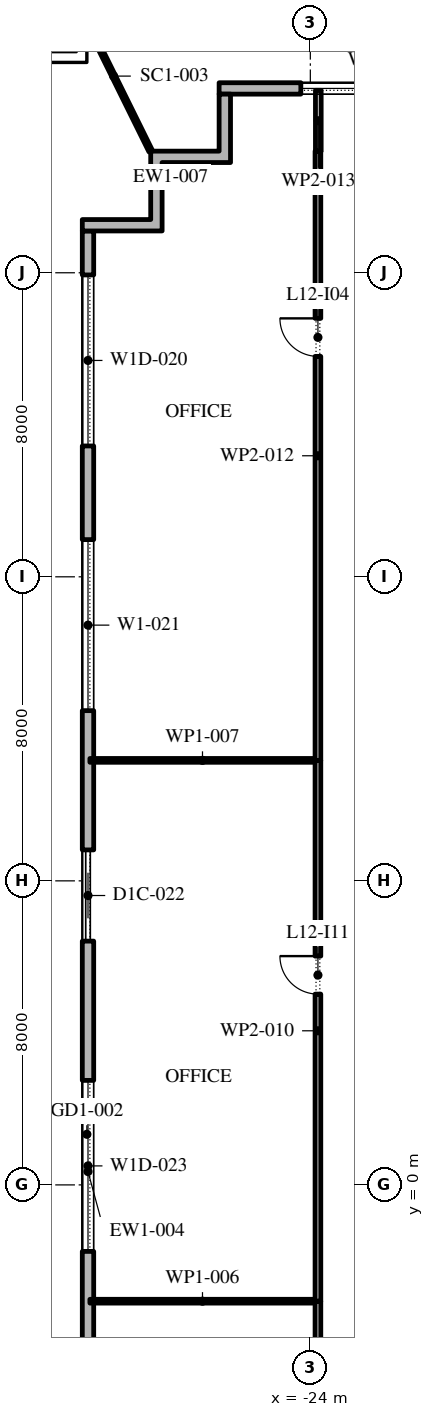
"""IFC4 building model, lengths in metres.
Left out: names, types, materials, properties, quantities, classifications, styles, units other than length and angle.
Written with IfcOpenShell. Run it as: python <this file> out.ifc"""

import sys

from ifc_helpers import new_model, si_unit, direction, frame, frame_2d, origin, place, context, subcontext, project, spatial, polyline, rectangle, outline, extrude, element, fill, save


model = new_model("IFC4")
c1 = context("Model", 3, precision=1e-05, world=origin(), true_north=direction((0.0, 1.0)))
c2 = subcontext(c1, "Body", "Model", "MODEL_VIEW")
j1 = project(units=[si_unit("LENGTHUNIT", "METRE"), si_unit("PLANEANGLEUNIT", "RADIAN")], contexts=[c1])
p1 = place(None, origin())
s1 = spatial("IfcSite", under=j1, at=p1, CompositionType="ELEMENT")
p2 = place(p1, origin())
s2 = spatial("IfcBuilding", under=s1, at=p2, CompositionType="ELEMENT")
p3 = place(p2, frame((0.0, 0.0, 60.6)))
s3 = spatial("IfcBuildingStorey", under=s2, at=p3, CompositionType="ELEMENT", Elevation=60.6)
p4 = place(p3, frame((26.1, 28.85, 0.0), z_axis=(0.0, 0.0, 1.0), x_axis=(-1.0, 0.0, 0.0)))
e1 = element("IfcWall", 1, at=p4, inside=s3, PredefinedType="STANDARD", context=c2, shape_type="SweptSolid", body=[
    extrude(rectangle(XDim=52.5, YDim=0.3, at=frame_2d((26.25, 0.0))), origin(), (0.0, 0.0, 1.0), 4.0),
])
p5 = place(p4, frame((2.0, 0.0, 0.45)))
e2 = element("IfcOpeningElement", 2, at=p5, cuts=e1, PredefinedType="OPENING", context=c2, shape_type="SweptSolid", body=[
    extrude(rectangle(XDim=4.5, YDim=3.0, at=frame_2d((2.25, 1.5))), frame((0.0, 0.16, 0.0), z_axis=(0.0, -1.0, 0.0), x_axis=(1.0, 0.0, 0.0)), (0.0, 0.0, 1.0), 0.32),
])
p6 = place(p4, frame((10.65, 0.0, 0.45)))
e3 = element("IfcOpeningElement", 3, at=p6, cuts=e1, PredefinedType="OPENING", context=c2, shape_type="SweptSolid", body=[
    extrude(rectangle(XDim=4.5, YDim=3.0, at=frame_2d((2.25, 1.5))), frame((0.0, 0.16, 0.0), z_axis=(0.0, -1.0, 0.0), x_axis=(1.0, 0.0, 0.0)), (0.0, 0.0, 1.0), 0.32),
])
p7 = place(p4, frame((20.5, 0.0, 0.0)))
e4 = element("IfcOpeningElement", 4, at=p7, cuts=e1, PredefinedType="OPENING", context=c2, shape_type="SweptSolid", body=[
    extrude(rectangle(XDim=2.4, YDim=3.5, at=frame_2d((1.2, 1.75))), frame((0.0, 0.16, 0.0), z_axis=(0.0, -1.0, 0.0), x_axis=(1.0, 0.0, 0.0)), (0.0, 0.0, 1.0), 0.32),
])
p8 = place(p4, frame((28.25, 0.0, 0.45)))
e5 = element("IfcOpeningElement", 5, at=p8, cuts=e1, PredefinedType="OPENING", context=c2, shape_type="SweptSolid", body=[
    extrude(rectangle(XDim=4.5, YDim=3.0, at=frame_2d((2.25, 1.5))), frame((0.0, 0.16, 0.0), z_axis=(0.0, -1.0, 0.0), x_axis=(1.0, 0.0, 0.0)), (0.0, 0.0, 1.0), 0.32),
])
p9 = place(p4, frame((37.05, 0.0, 0.45)))
e6 = element("IfcOpeningElement", 6, at=p9, cuts=e1, PredefinedType="OPENING", context=c2, shape_type="SweptSolid", body=[
    extrude(rectangle(XDim=4.5, YDim=3.0, at=frame_2d((2.25, 1.5))), frame((0.0, 0.16, 0.0), z_axis=(0.0, -1.0, 0.0), x_axis=(1.0, 0.0, 0.0)), (0.0, 0.0, 1.0), 0.32),
])
p10 = place(p4, frame((45.85, 0.0, 0.45)))
e7 = element("IfcOpeningElement", 7, at=p10, cuts=e1, PredefinedType="OPENING", context=c2, shape_type="SweptSolid", body=[
    extrude(rectangle(XDim=4.5, YDim=3.0, at=frame_2d((2.25, 1.5))), frame((0.0, 0.16, 0.0), z_axis=(0.0, -1.0, 0.0), x_axis=(1.0, 0.0, 0.0)), (0.0, 0.0, 1.0), 0.32),
])
p11 = place(p3, frame((-29.85, 25.1, 0.0), z_axis=(0.0, 0.0, 1.0), x_axis=(0.0, -1.0, 0.0)))
e8 = element("IfcWall", 8, at=p11, inside=s3, PredefinedType="STANDARD", context=c2, shape_type="SweptSolid", body=[
    extrude(rectangle(XDim=49.5, YDim=0.3, at=frame_2d((24.75, 0.0))), origin(), (0.0, 0.0, 1.0), 4.0),
])
p12 = place(p11, frame((1.157, 0.0, 0.45)))
e9 = element("IfcOpeningElement", 9, at=p12, cuts=e8, PredefinedType="OPENING", context=c2, shape_type="SweptSolid", body=[
    extrude(rectangle(XDim=4.5, YDim=2.875, at=frame_2d((2.25, 1.438))), frame((0.0, 0.16, 0.0), z_axis=(0.0, -1.0, 0.0), x_axis=(1.0, 0.0, 0.0)), (0.0, 0.0, 1.0), 0.32),
])
p13 = place(p11, frame((8.121, 0.0, 0.45)))
e10 = element("IfcOpeningElement", 10, at=p13, cuts=e8, PredefinedType="OPENING", context=c2, shape_type="SweptSolid", body=[
    extrude(rectangle(XDim=4.5, YDim=3.05, at=frame_2d((2.25, 1.525))), frame((0.0, 0.16, 0.0), z_axis=(0.0, -1.0, 0.0), x_axis=(1.0, 0.0, 0.0)), (0.0, 0.0, 1.0), 0.32),
])
p14 = place(p11, frame((16.286, 0.0, 0.0)))
e11 = element("IfcOpeningElement", 11, at=p14, cuts=e8, PredefinedType="OPENING", context=c2, shape_type="SweptSolid", body=[
    extrude(rectangle(XDim=2.4, YDim=3.325, at=frame_2d((1.2, 1.663))), frame((0.0, 0.16, 0.0), z_axis=(0.0, -1.0, 0.0), x_axis=(1.0, 0.0, 0.0)), (0.0, 0.0, 1.0), 0.32),
])
p15 = place(p11, frame((22.35, 0.0, 0.45)))
e12 = element("IfcOpeningElement", 12, at=p15, cuts=e8, PredefinedType="OPENING", context=c2, shape_type="SweptSolid", body=[
    extrude(rectangle(XDim=4.5, YDim=2.875, at=frame_2d((2.25, 1.438))), frame((0.0, 0.16, 0.0), z_axis=(0.0, -1.0, 0.0), x_axis=(1.0, 0.0, 0.0)), (0.0, 0.0, 1.0), 0.32),
])
p16 = place(p11, frame((29.464, 0.0, 0.45)))
e13 = element("IfcOpeningElement", 13, at=p16, cuts=e8, PredefinedType="OPENING", context=c2, shape_type="SweptSolid", body=[
    extrude(rectangle(XDim=4.5, YDim=2.875, at=frame_2d((2.25, 1.438))), frame((0.0, 0.16, 0.0), z_axis=(0.0, -1.0, 0.0), x_axis=(1.0, 0.0, 0.0)), (0.0, 0.0, 1.0), 0.32),
])
p17 = place(p11, frame((36.579, 0.0, 0.45)))
e14 = element("IfcOpeningElement", 14, at=p17, cuts=e8, PredefinedType="OPENING", context=c2, shape_type="SweptSolid", body=[
    extrude(rectangle(XDim=4.5, YDim=2.825, at=frame_2d((2.25, 1.413))), frame((0.0, 0.16, 0.0), z_axis=(0.0, -1.0, 0.0), x_axis=(1.0, 0.0, 0.0)), (0.0, 0.0, 1.0), 0.32),
])
p18 = place(p11, frame((44.743, 0.0, 0.0)))
e15 = element("IfcOpeningElement", 15, at=p18, cuts=e8, PredefinedType="OPENING", context=c2, shape_type="SweptSolid", body=[
    extrude(rectangle(XDim=2.4, YDim=3.5, at=frame_2d((1.2, 1.75))), frame((0.0, 0.16, 0.0), z_axis=(0.0, -1.0, 0.0), x_axis=(1.0, 0.0, 0.0)), (0.0, 0.0, 1.0), 0.32),
])
p19 = place(p3, origin())
e16 = element("IfcWall", 16, at=p19, inside=s3, PredefinedType="STANDARD", context=c2, shape_type="SweptSolid", body=[
    extrude(outline(polyline([(-28.2, 25.4), (-28.2, 27.2), (-26.4, 27.2), (-26.4, 28.7), (-26.1, 28.7), (-26.1, 26.9), (-27.9, 26.9), (-27.9, 25.1), (-30.0, 25.1), (-30.0, 25.4), (-28.2, 25.4)])), origin(), (0.0, 0.0, 1.0), 4.0),
])
p20 = place(p3, frame((-28.2, 27.2, -0.05), z_axis=(0.0, 0.0, 1.0), x_axis=(-0.443174643924, 0.896435293249, 0.0)))
e17 = element("IfcWall", 17, at=p20, inside=s3, PredefinedType="STANDARD", context=c2, shape_type="SweptSolid", body=[
    extrude(rectangle(XDim=4.406, YDim=0.1, at=frame_2d((2.203, 0.0))), origin(), (0.0, 0.0, 1.0), 4.05),
])
p21 = place(p3, frame((-23.8, -10.12, 0.0), z_axis=(0.0, 0.0, 1.0), x_axis=(0.0, 1.0, 0.0)))
e18 = element("IfcWall", 18, at=p21, inside=s3, PredefinedType="PARTITIONING", context=c2, shape_type="SweptSolid", body=[
    extrude(rectangle(XDim=7.06, YDim=0.15, at=frame_2d((3.53, 0.0))), origin(), (0.0, 0.0, 1.0), 4.0),
])
p22 = place(p21, frame((1.66, 0.0, 0.0)))
e19 = element("IfcOpeningElement", 19, at=p22, cuts=e18, PredefinedType="OPENING", context=c2, shape_type="SweptSolid", body=[
    extrude(rectangle(XDim=1.0, YDim=2.1, at=frame_2d((0.5, 1.05))), frame((0.0, 0.085, 0.0), z_axis=(0.0, -1.0, 0.0), x_axis=(1.0, 0.0, 0.0)), (0.0, 0.0, 1.0), 0.17),
])
p23 = place(p3, frame((-23.875, -3.06, 0.0), z_axis=(0.0, 0.0, 1.0), x_axis=(-1.0, 0.0, 0.0)))
e20 = element("IfcWall", 20, at=p23, inside=s3, PredefinedType="PARTITIONING", context=c2, shape_type="SweptSolid", body=[
    extrude(rectangle(XDim=5.925, YDim=0.1, at=frame_2d((2.962, 0.0))), origin(), (0.0, 0.0, 1.0), 4.0),
])
p24 = place(p3, frame((-23.8, -3.06, 0.0), z_axis=(0.0, 0.0, 1.0), x_axis=(0.0, 1.0, 0.0)))
e21 = element("IfcWall", 21, at=p24, inside=s3, PredefinedType="PARTITIONING", context=c2, shape_type="SweptSolid", body=[
    extrude(rectangle(XDim=14.23, YDim=0.15, at=frame_2d((7.115, 0.0))), origin(), (0.0, 0.0, 1.0), 4.0),
])
p25 = place(p24, frame((8.08, 0.0, 0.0)))
e22 = element("IfcOpeningElement", 22, at=p25, cuts=e21, PredefinedType="OPENING", context=c2, shape_type="SweptSolid", body=[
    extrude(rectangle(XDim=1.0, YDim=2.1, at=frame_2d((0.5, 1.05))), frame((0.0, 0.085, 0.0), z_axis=(0.0, -1.0, 0.0), x_axis=(1.0, 0.0, 0.0)), (0.0, 0.0, 1.0), 0.17),
])
p26 = place(p3, frame((-23.875, 11.17, 0.0), z_axis=(0.0, 0.0, 1.0), x_axis=(-1.0, 0.0, 0.0)))
e23 = element("IfcWall", 23, at=p26, inside=s3, PredefinedType="PARTITIONING", context=c2, shape_type="SweptSolid", body=[
    extrude(rectangle(XDim=5.925, YDim=0.1, at=frame_2d((2.962, 0.0))), origin(), (0.0, 0.0, 1.0), 4.0),
])
p27 = place(p3, frame((-23.8, 11.17, 0.0), z_axis=(0.0, 0.0, 1.0), x_axis=(0.0, 1.0, 0.0)))
e24 = element("IfcWall", 24, at=p27, inside=s3, PredefinedType="PARTITIONING", context=c2, shape_type="SweptSolid", body=[
    extrude(rectangle(XDim=16.03, YDim=0.15, at=frame_2d((8.015, 0.0))), origin(), (0.0, 0.0, 1.0), 4.0),
])
p28 = place(p27, frame((10.63, 0.0, 0.0)))
e25 = element("IfcOpeningElement", 25, at=p28, cuts=e24, PredefinedType="OPENING", context=c2, shape_type="SweptSolid", body=[
    extrude(rectangle(XDim=1.0, YDim=2.1, at=frame_2d((0.5, 1.05))), frame((0.0, 0.085, 0.0), z_axis=(0.0, -1.0, 0.0), x_axis=(1.0, 0.0, 0.0)), (0.0, 0.0, 1.0), 0.17),
])
p29 = place(p3, frame((-23.79, 27.2, 0.0), z_axis=(0.0, 0.0, 1.0), x_axis=(0.0, 1.0, 0.0)))
e26 = element("IfcWall", 26, at=p29, inside=s3, PredefinedType="PARTITIONING", context=c2, shape_type="SweptSolid", body=[
    extrude(rectangle(XDim=1.6, YDim=0.15, at=frame_2d((0.8, 0.0))), origin(), (0.0, 0.0, 1.0), 4.0),
])
p30 = place(p10, origin())
e27 = element("IfcWindow", 27, at=p30, inside=s3, PartitioningType="DOUBLE_PANEL_VERTICAL", PredefinedType="WINDOW", context=c2, shape_type="SweptSolid", body=[
    extrude(rectangle(XDim=4.5, YDim=3.0, at=frame_2d((2.25, 1.5))), frame((0.0, 0.03, 0.0), z_axis=(0.0, -1.0, 0.0), x_axis=(1.0, 0.0, 0.0)), (0.0, 0.0, 1.0), 0.06),
])
fill(e7, e27)
p31 = place(p12, origin())
e28 = element("IfcWindow", 28, at=p31, inside=s3, PartitioningType="DOUBLE_PANEL_VERTICAL", PredefinedType="WINDOW", context=c2, shape_type="SweptSolid", body=[
    extrude(rectangle(XDim=4.5, YDim=2.875, at=frame_2d((2.25, 1.438))), frame((0.0, 0.03, 0.0), z_axis=(0.0, -1.0, 0.0), x_axis=(1.0, 0.0, 0.0)), (0.0, 0.0, 1.0), 0.06),
])
fill(e9, e28)
p32 = place(p13, origin())
e29 = element("IfcWindow", 29, at=p32, inside=s3, PartitioningType="DOUBLE_PANEL_VERTICAL", PredefinedType="WINDOW", context=c2, shape_type="SweptSolid", body=[
    extrude(rectangle(XDim=4.5, YDim=3.05, at=frame_2d((2.25, 1.525))), frame((0.0, 0.03, 0.0), z_axis=(0.0, -1.0, 0.0), x_axis=(1.0, 0.0, 0.0)), (0.0, 0.0, 1.0), 0.06),
])
fill(e10, e29)
p33 = place(p14, origin())
e30 = element("IfcDoor", 30, at=p33, inside=s3, OperationType="DOUBLE_DOOR_SLIDING", PredefinedType="DOOR", context=c2, shape_type="SweptSolid", body=[
    extrude(rectangle(XDim=2.4, YDim=3.325, at=frame_2d((1.2, 1.663))), frame((0.0, 0.025, 0.0), z_axis=(0.0, -1.0, 0.0), x_axis=(1.0, 0.0, 0.0)), (0.0, 0.0, 1.0), 0.05),
])
fill(e11, e30)
p34 = place(p15, origin())
e31 = element("IfcWindow", 31, at=p34, inside=s3, PartitioningType="DOUBLE_PANEL_VERTICAL", PredefinedType="WINDOW", context=c2, shape_type="SweptSolid", body=[
    extrude(rectangle(XDim=4.5, YDim=2.875, at=frame_2d((2.25, 1.438))), frame((0.0, 0.03, 0.0), z_axis=(0.0, -1.0, 0.0), x_axis=(1.0, 0.0, 0.0)), (0.0, 0.0, 1.0), 0.06),
])
fill(e12, e31)
p35 = place(p28, origin())
e32 = element("IfcDoor", 32, at=p35, inside=s3, OperationType="SINGLE_SWING_LEFT", PredefinedType="DOOR", context=c2, shape_type="SweptSolid", body=[
    extrude(rectangle(XDim=1.0, YDim=2.1, at=frame_2d((0.5, 1.05))), frame((0.0, 0.025, 0.0), z_axis=(0.0, -1.0, 0.0), x_axis=(1.0, 0.0, 0.0)), (0.0, 0.0, 1.0), 0.05),
])
fill(e25, e32)
p36 = place(p25, origin())
e33 = element("IfcDoor", 33, at=p36, inside=s3, OperationType="SINGLE_SWING_LEFT", PredefinedType="DOOR", context=c2, shape_type="SweptSolid", body=[
    extrude(rectangle(XDim=1.0, YDim=2.1, at=frame_2d((0.5, 1.05))), frame((0.0, 0.025, 0.0), z_axis=(0.0, -1.0, 0.0), x_axis=(1.0, 0.0, 0.0)), (0.0, 0.0, 1.0), 0.05),
])
fill(e22, e33)
save(model, sys.argv[1])
